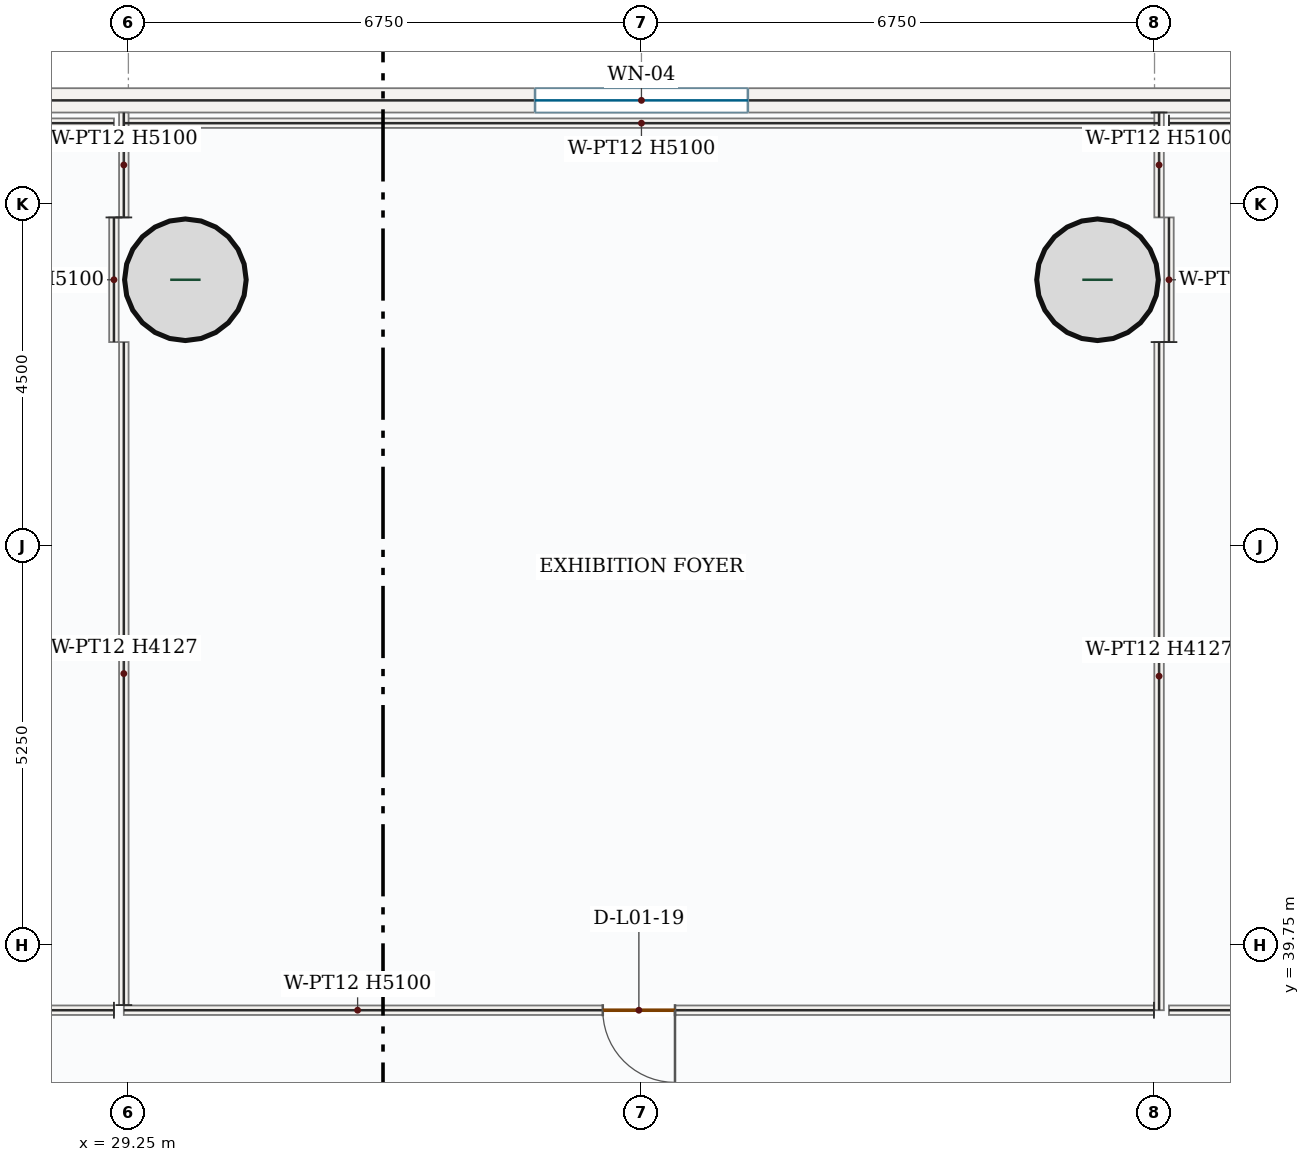
"""IFC4 building model, lengths in metres.
Left out: names, types, materials, properties, quantities, classifications, styles, units other than length and angle.
Written with IfcOpenShell. Run it as: python <this file> out.ifc"""

import sys

from ifc_helpers import new_model, si_unit, direction, frame, frame_2d, origin, origin_2d, place, context, subcontext, project, spatial, rectangle, hollow_circle, extrude, source, transform, mapped, element, fill, save


model = new_model("IFC4")
c1 = context("Model", 3, precision=1e-05, world=origin(), true_north=direction((0.0, 1.0)))
c2 = subcontext(c1, "Body", "Model", "MODEL_VIEW")
j1 = project(units=[si_unit("LENGTHUNIT", "METRE"), si_unit("PLANEANGLEUNIT", "RADIAN")], contexts=[c1])
p1 = place(None, origin())
s1 = spatial("IfcSite", under=j1, at=p1, CompositionType="ELEMENT")
p2 = place(p1, origin())
s2 = spatial("IfcBuilding", under=s1, at=p2, CompositionType="ELEMENT")
p3 = place(p2, frame((0.0, 0.0, 7.2)))
s3 = spatial("IfcBuildingStorey", under=s2, at=p3, CompositionType="ELEMENT", Elevation=7.2)
m1 = source(origin(), c2, "Body", "SweptSolid", [
    extrude(hollow_circle(Radius=0.8, WallThickness=0.06, at=origin_2d()), origin(), (0.0, 0.0, 1.0), 5.4),
])
for number, where, z_axis, x_axis in (
    (1, (30.0, 48.5, 0.0), (0.0, 0.0, 1.0), (1.0, 0.0, 0.0)),
    (2, (42.0, 48.5, 0.0), (0.0, 0.0, 1.0), (1.0, 0.0, 0.0)),
):
    element("IfcColumn", number, at=place(p3, frame(where, z_axis=z_axis, x_axis=x_axis)), inside=s3, PredefinedType="COLUMN", context=c2, shape_type="MappedRepresentation", body=[
        mapped(m1, transform((0.0, 0.0, 0.0), x_axis=(1.0, 0.0, 0.0), y_axis=(0.0, 1.0, 0.0), z_axis=(0.0, 0.0, 1.0), scale=1.0)),
    ])
p4 = place(p3, frame((4.84, 50.86, 0.0), z_axis=(0.0, 0.0, 1.0), x_axis=(1.0, 0.0, 0.0)))
e3 = element("IfcWall", 3, at=p4, inside=s3, PredefinedType="SOLIDWALL", context=c2, shape_type="SweptSolid", body=[
    extrude(rectangle(XDim=62.32, YDim=0.32, at=frame_2d((31.16, 0.0))), origin(), (0.0, 0.0, 1.0), 5.1),
])
p5 = place(p4, frame((29.76, 0.0, 0.85)))
e4 = element("IfcOpeningElement", 4, at=p5, cuts=e3, PredefinedType="OPENING", context=c2, shape_type="SweptSolid", body=[
    extrude(rectangle(XDim=2.8, YDim=2.4, at=frame_2d((1.4, 1.2))), frame((0.0, 0.17, 0.0), z_axis=(0.0, -1.0, 0.0), x_axis=(1.0, 0.0, 0.0)), (0.0, 0.0, 1.0), 0.34),
])
m2 = source(origin(), c2, "Body", "SweptSolid", [
    extrude(rectangle(XDim=13.62, YDim=0.125, at=frame_2d((6.81, 0.0))), origin(), (0.0, 0.0, 1.0), 5.1),
])
p6 = place(p3, frame((29.19, 50.56, 0.0), z_axis=(0.0, 0.0, 1.0), x_axis=(1.0, 0.0, 0.0)))
e5 = element("IfcWall", 5, at=p6, inside=s3, PredefinedType="PARTITIONING", context=c2, shape_type="MappedRepresentation", body=[
    mapped(m2, transform((0.0, 0.0, 0.0), x_axis=(1.0, 0.0, 0.0), y_axis=(0.0, 1.0, 0.0), z_axis=(0.0, 0.0, 1.0), scale=1.0)),
])
m3 = source(origin(), c2, "Body", "SweptSolid", [
    extrude(rectangle(XDim=1.38, YDim=0.125, at=frame_2d((0.69, 0.0))), origin(), (0.0, 0.0, 1.0), 5.1),
])
p7 = place(p3, frame((42.81, 50.7, 0.0), z_axis=(0.0, 0.0, 1.0), x_axis=(0.0, -1.0, 0.0)))
e6 = element("IfcWall", 6, at=p7, inside=s3, PredefinedType="PARTITIONING", context=c2, shape_type="MappedRepresentation", body=[
    mapped(m3, transform((0.0, 0.0, 0.0), x_axis=(1.0, 0.0, 0.0), y_axis=(0.0, 1.0, 0.0), z_axis=(0.0, 0.0, 1.0), scale=1.0)),
])
m4 = source(origin(), c2, "Body", "SweptSolid", [
    extrude(rectangle(XDim=8.79, YDim=0.125, at=frame_2d((4.395, 0.0))), origin(), (0.0, 0.0, 1.0), 4.127),
])
p8 = place(p3, frame((42.81, 47.68, 0.0), z_axis=(0.0, 0.0, 1.0), x_axis=(0.0, -1.0, 0.0)))
e7 = element("IfcWall", 7, at=p8, inside=s3, PredefinedType="PARTITIONING", context=c2, shape_type="MappedRepresentation", body=[
    mapped(m4, transform((0.0, 0.0, 0.0), x_axis=(1.0, 0.0, 0.0), y_axis=(0.0, 1.0, 0.0), z_axis=(0.0, 0.0, 1.0), scale=1.0)),
])
p9 = place(p3, frame((42.742, 38.89, 0.0), z_axis=(0.0, 0.0, 1.0), x_axis=(-1.0, 0.0, 0.0)))
e8 = element("IfcWall", 8, at=p9, inside=s3, PredefinedType="PARTITIONING", context=c2, shape_type="SweptSolid", body=[
    extrude(rectangle(XDim=13.552, YDim=0.125, at=frame_2d((6.776, 0.0))), origin(), (0.0, 0.0, 1.0), 5.1),
])
p10 = place(p9, frame((6.301, 0.0, 0.0)))
e9 = element("IfcOpeningElement", 9, at=p10, cuts=e8, PredefinedType="OPENING", context=c2, shape_type="SweptSolid", body=[
    extrude(rectangle(XDim=0.95, YDim=2.15, at=frame_2d((0.475, 1.075))), frame((0.0, 0.073, 0.0), z_axis=(0.0, -1.0, 0.0), x_axis=(1.0, 0.0, 0.0)), (0.0, 0.0, 1.0), 0.145),
])
m5 = source(origin(), c2, "Body", "SweptSolid", [
    extrude(rectangle(XDim=8.722, YDim=0.125, at=frame_2d((4.361, 0.0))), origin(), (0.0, 0.0, 1.0), 4.127),
])
p11 = place(p3, frame((29.19, 38.958, 0.0), z_axis=(0.0, 0.0, 1.0), x_axis=(0.0, 1.0, 0.0)))
e10 = element("IfcWall", 10, at=p11, inside=s3, PredefinedType="PARTITIONING", context=c2, shape_type="MappedRepresentation", body=[
    mapped(m5, transform((0.0, 0.0, 0.0), x_axis=(1.0, 0.0, 0.0), y_axis=(0.0, 1.0, 0.0), z_axis=(0.0, 0.0, 1.0), scale=1.0)),
])
p12 = place(p3, frame((29.19, 49.32, 0.0), z_axis=(0.0, 0.0, 1.0), x_axis=(0.0, 1.0, 0.0)))
e11 = element("IfcWall", 11, at=p12, inside=s3, PredefinedType="PARTITIONING", context=c2, shape_type="MappedRepresentation", body=[
    mapped(m3, transform((0.0, 0.0, 0.0), x_axis=(1.0, 0.0, 0.0), y_axis=(0.0, 1.0, 0.0), z_axis=(0.0, 0.0, 1.0), scale=1.0)),
])
m6 = source(origin(), c2, "Body", "SweptSolid", [
    extrude(rectangle(XDim=1.64, YDim=0.125, at=frame_2d((0.82, 0.0))), origin(), (0.0, 0.0, 1.0), 5.1),
])
p13 = place(p3, frame((29.06, 49.32, 0.0), z_axis=(0.0, 0.0, 1.0), x_axis=(0.0, -1.0, 0.0)))
e12 = element("IfcWall", 12, at=p13, inside=s3, PredefinedType="PARTITIONING", context=c2, shape_type="MappedRepresentation", body=[
    mapped(m6, transform((0.0, 0.0, 0.0), x_axis=(1.0, 0.0, 0.0), y_axis=(0.0, 1.0, 0.0), z_axis=(0.0, 0.0, 1.0), scale=1.0)),
])
m7 = source(origin(), c2, "Body", "SweptSolid", [
    extrude(rectangle(XDim=6.556, YDim=0.125, at=frame_2d((3.278, 0.0))), origin(), (0.0, 0.0, 1.0), 5.1),
])
p14 = place(p3, frame((29.06, 38.89, 0.0), z_axis=(0.0, 0.0, 1.0), x_axis=(-1.0, 0.0, 0.0)))
e13 = element("IfcWall", 13, at=p14, inside=s3, PredefinedType="PARTITIONING", context=c2, shape_type="MappedRepresentation", body=[
    mapped(m7, transform((0.0, 0.0, 0.0), x_axis=(1.0, 0.0, 0.0), y_axis=(0.0, 1.0, 0.0), z_axis=(0.0, 0.0, 1.0), scale=1.0)),
])
m8 = source(origin(), c2, "Body", "SweptSolid", [
    extrude(rectangle(XDim=10.49, YDim=0.125, at=frame_2d((5.245, 0.0))), origin(), (0.0, 0.0, 1.0), 5.1),
])
p15 = place(p3, frame((18.57, 50.56, 0.0), z_axis=(0.0, 0.0, 1.0), x_axis=(1.0, 0.0, 0.0)))
e14 = element("IfcWall", 14, at=p15, inside=s3, PredefinedType="PARTITIONING", context=c2, shape_type="MappedRepresentation", body=[
    mapped(m8, transform((0.0, 0.0, 0.0), x_axis=(1.0, 0.0, 0.0), y_axis=(0.0, 1.0, 0.0), z_axis=(0.0, 0.0, 1.0), scale=1.0)),
])
m9 = source(origin(), c2, "Body", "SweptSolid", [
    extrude(rectangle(XDim=6.554, YDim=0.125, at=frame_2d((3.277, 0.0))), origin(), (0.0, 0.0, 1.0), 5.1),
])
p16 = place(p3, frame((49.494, 38.89, 0.0), z_axis=(0.0, 0.0, 1.0), x_axis=(-1.0, 0.0, 0.0)))
e15 = element("IfcWall", 15, at=p16, inside=s3, PredefinedType="PARTITIONING", context=c2, shape_type="MappedRepresentation", body=[
    mapped(m9, transform((0.0, 0.0, 0.0), x_axis=(1.0, 0.0, 0.0), y_axis=(0.0, 1.0, 0.0), z_axis=(0.0, 0.0, 1.0), scale=1.0)),
])
p17 = place(p3, frame((42.94, 47.68, 0.0), z_axis=(0.0, 0.0, 1.0), x_axis=(0.0, 1.0, 0.0)))
e16 = element("IfcWall", 16, at=p17, inside=s3, PredefinedType="PARTITIONING", context=c2, shape_type="MappedRepresentation", body=[
    mapped(m6, transform((0.0, 0.0, 0.0), x_axis=(1.0, 0.0, 0.0), y_axis=(0.0, 1.0, 0.0), z_axis=(0.0, 0.0, 1.0), scale=1.0)),
])
p18 = place(p3, frame((42.94, 50.56, 0.0), z_axis=(0.0, 0.0, 1.0), x_axis=(1.0, 0.0, 0.0)))
e17 = element("IfcWall", 17, at=p18, inside=s3, PredefinedType="PARTITIONING", context=c2, shape_type="MappedRepresentation", body=[
    mapped(m8, transform((0.0, 0.0, 0.0), x_axis=(1.0, 0.0, 0.0), y_axis=(0.0, 1.0, 0.0), z_axis=(0.0, 0.0, 1.0), scale=1.0)),
])
m10 = source(origin(), c2, "Body", "SweptSolid", [
    extrude(rectangle(XDim=2.8, YDim=2.4, at=frame_2d((1.4, 1.2))), frame((0.0, 0.03, 0.0), z_axis=(0.0, -1.0, 0.0), x_axis=(1.0, 0.0, 0.0)), (0.0, 0.0, 1.0), 0.06),
])
p19 = place(p5, origin())
e18 = element("IfcWindow", 18, at=p19, inside=s3, PartitioningType="TRIPLE_PANEL_VERTICAL", PredefinedType="WINDOW", context=c2, shape_type="MappedRepresentation", body=[
    mapped(m10, transform((0.0, 0.0, 0.0), x_axis=(1.0, 0.0, 0.0), y_axis=(0.0, 1.0, 0.0), z_axis=(0.0, 0.0, 1.0), scale=1.0)),
])
fill(e4, e18)
m11 = source(origin(), c2, "Body", "SweptSolid", [
    extrude(rectangle(XDim=0.95, YDim=2.15, at=frame_2d((0.475, 1.075))), frame((0.0, 0.025, 0.0), z_axis=(0.0, -1.0, 0.0), x_axis=(1.0, 0.0, 0.0)), (0.0, 0.0, 1.0), 0.05),
])
p20 = place(p10, origin())
e19 = element("IfcDoor", 19, at=p20, inside=s3, OperationType="SINGLE_SWING_LEFT", PredefinedType="DOOR", context=c2, shape_type="MappedRepresentation", body=[
    mapped(m11, transform((0.0, 0.0, 0.0), x_axis=(1.0, 0.0, 0.0), y_axis=(0.0, 1.0, 0.0), z_axis=(0.0, 0.0, 1.0), scale=1.0)),
])
fill(e9, e19)
save(model, sys.argv[1])
